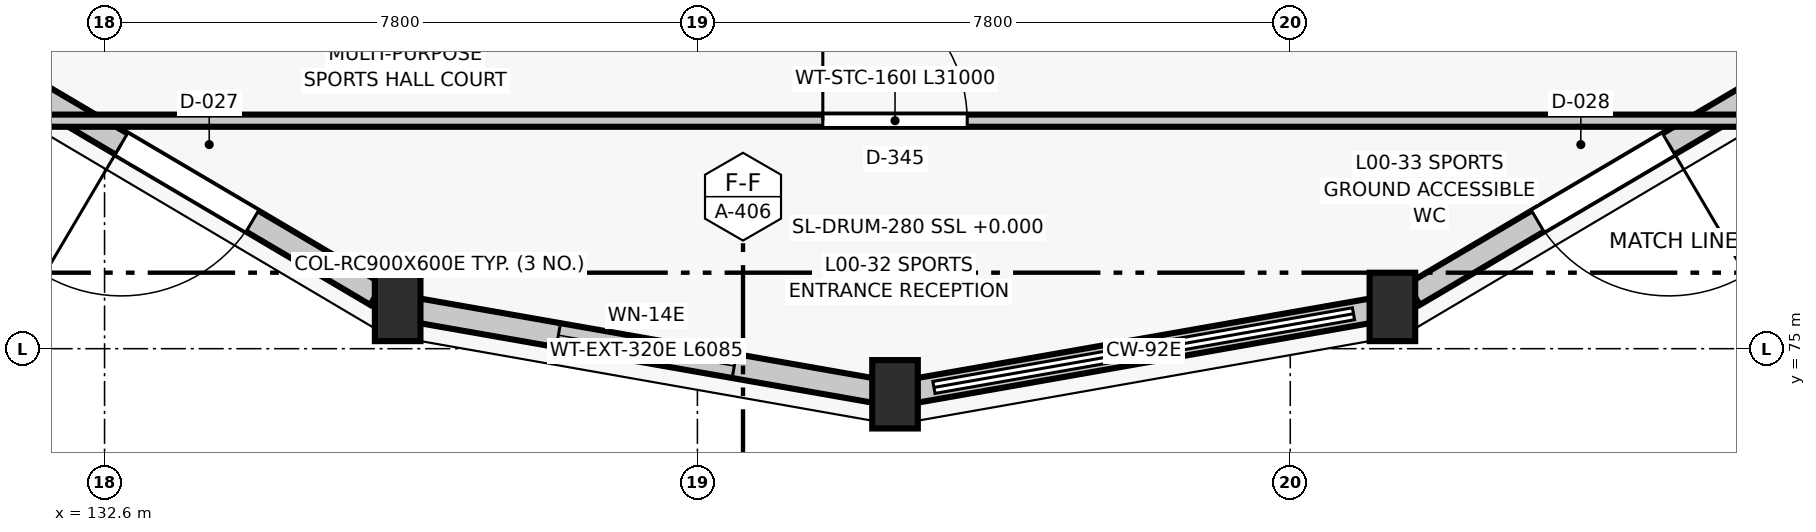
"""IFC4 building model, lengths in metres.
Left out: names, types, materials, properties, quantities, classifications, styles, units other than length and angle.
Written with IfcOpenShell. Run it as: python <this file> out.ifc"""

import sys

from ifc_helpers import new_model, si_unit, direction, frame, frame_2d, origin, origin_2d, place, context, subcontext, project, spatial, rectangle, extrude, element, fill, save


model = new_model("IFC4")
c1 = context("Model", 3, precision=1e-05, world=origin(), true_north=direction((0.0, 1.0)))
c2 = subcontext(c1, "Body", "Model", "MODEL_VIEW")
j1 = project(units=[si_unit("LENGTHUNIT", "METRE"), si_unit("PLANEANGLEUNIT", "RADIAN")], contexts=[c1])
p1 = place(None, origin())
s1 = spatial("IfcSite", under=j1, at=p1, CompositionType="ELEMENT")
p2 = place(p1, origin())
s2 = spatial("IfcBuilding", under=s1, at=p2, CompositionType="ELEMENT")
p3 = place(p2, origin())
s3 = spatial("IfcBuildingStorey", under=s2, at=p3, CompositionType="ELEMENT", Elevation=0.0)
for number, where, z_axis, x_axis in (
    (1, (136.456, 75.549, 0.0), (0.0, 0.0, 1.0), (1.0, 0.0, 0.0)),
    (2, (143.0, 74.4, 0.0), (0.0, 0.0, 1.0), (1.0, 0.0, 0.0)),
    (3, (149.544, 75.549, 0.0), (0.0, 0.0, 1.0), (1.0, 0.0, 0.0)),
):
    element("IfcColumn", number, at=place(p3, frame(where, z_axis=z_axis, x_axis=x_axis)), inside=s3, PredefinedType="COLUMN", context=c2, shape_type="SweptSolid", body=[
        extrude(rectangle(XDim=0.6, YDim=0.9, at=origin_2d()), origin(), (0.0, 0.0, 1.0), 4.5),
    ])
p4 = place(p3, frame((136.177, 75.714, 0.0), z_axis=(0.0, 0.0, 1.0), x_axis=(-0.861235880181, 0.508205429614, 0.0)))
e4 = element("IfcWall", 4, at=p4, inside=s3, PredefinedType="STANDARD", context=c2, shape_type="SweptSolid", body=[
    extrude(rectangle(XDim=5.794, YDim=0.32, at=frame_2d((2.897, 0.0))), origin(), (0.0, 0.0, 1.0), 3.445),
])
p5 = place(p4, frame((1.897, 0.0, 0.0)))
e5 = element("IfcOpeningElement", 5, at=p5, cuts=e4, PredefinedType="OPENING", context=c2, shape_type="SweptSolid", body=[
    extrude(rectangle(XDim=2.0, YDim=2.3, at=frame_2d((1.0, 1.15))), frame((0.0, 0.17, 0.0), z_axis=(0.0, -1.0, 0.0), x_axis=(1.0, 0.0, 0.0)), (0.0, 0.0, 1.0), 0.34),
])
p6 = place(p3, frame((142.725, 74.448, 0.0), z_axis=(0.0, 0.0, 1.0), x_axis=(-0.984927418504, 0.172968148166, 0.0)))
e6 = element("IfcWall", 6, at=p6, inside=s3, PredefinedType="STANDARD", context=c2, shape_type="SweptSolid", body=[
    extrude(rectangle(XDim=6.085, YDim=0.32, at=frame_2d((3.042, 0.0))), origin(), (0.0, 0.0, 1.0), 3.445),
])
p7 = place(p6, frame((1.867, 0.0, 0.9)))
e7 = element("IfcOpeningElement", 7, at=p7, cuts=e6, PredefinedType="OPENING", context=c2, shape_type="SweptSolid", body=[
    extrude(rectangle(XDim=2.35, YDim=1.55, at=frame_2d((1.175, 0.775))), frame((0.0, 0.17, 0.0), z_axis=(0.0, -1.0, 0.0), x_axis=(1.0, 0.0, 0.0)), (0.0, 0.0, 1.0), 0.34),
])
p8 = place(p3, frame((149.269, 75.501, 0.0), z_axis=(0.0, 0.0, 1.0), x_axis=(-0.984927418504, -0.172968148166, 0.0)))
e8 = element("IfcWall", 8, at=p8, inside=s3, PredefinedType="STANDARD", context=c2, shape_type="SweptSolid", body=[
    extrude(rectangle(XDim=6.085, YDim=0.32, at=frame_2d((3.042, 0.0))), origin(), (0.0, 0.0, 1.0), 0.85),
])
p9 = place(p3, frame((154.813, 78.658, 0.0), z_axis=(0.0, 0.0, 1.0), x_axis=(-0.861235880181, -0.508205429614, 0.0)))
e9 = element("IfcWall", 9, at=p9, inside=s3, PredefinedType="STANDARD", context=c2, shape_type="SweptSolid", body=[
    extrude(rectangle(XDim=5.794, YDim=0.32, at=frame_2d((2.897, 0.0))), origin(), (0.0, 0.0, 1.0), 3.445),
])
p10 = place(p9, frame((1.897, 0.0, 0.0)))
e10 = element("IfcOpeningElement", 10, at=p10, cuts=e9, PredefinedType="OPENING", context=c2, shape_type="SweptSolid", body=[
    extrude(rectangle(XDim=2.0, YDim=2.3, at=frame_2d((1.0, 1.15))), frame((0.0, 0.17, 0.0), z_axis=(0.0, -1.0, 0.0), x_axis=(1.0, 0.0, 0.0)), (0.0, 0.0, 1.0), 0.34),
])
p11 = place(p3, frame((127.5, 78.0, 0.0), z_axis=(0.0, 0.0, 1.0), x_axis=(1.0, 0.0, 0.0)))
e11 = element("IfcWall", 11, at=p11, inside=s3, PredefinedType="PARTITIONING", context=c2, shape_type="SweptSolid", body=[
    extrude(rectangle(XDim=31.0, YDim=0.16, at=frame_2d((15.5, 0.0))), origin(), (0.0, 0.0, 1.0), 4.255),
])
p12 = place(p11, frame((14.55, 0.0, 0.0)))
e12 = element("IfcOpeningElement", 12, at=p12, cuts=e11, PredefinedType="OPENING", context=c2, shape_type="SweptSolid", body=[
    extrude(rectangle(XDim=1.9, YDim=2.25, at=frame_2d((0.95, 1.125))), frame((0.0, 0.09, 0.0), z_axis=(0.0, -1.0, 0.0), x_axis=(1.0, 0.0, 0.0)), (0.0, 0.0, 1.0), 0.18),
])
p13 = place(p5, origin())
e13 = element("IfcDoor", 13, at=p13, inside=s3, OperationType="SINGLE_SWING_RIGHT", PredefinedType="DOOR", context=c2, shape_type="SweptSolid", body=[
    extrude(rectangle(XDim=2.0, YDim=2.3, at=frame_2d((1.0, 1.15))), frame((0.0, 0.025, 0.0), z_axis=(0.0, -1.0, 0.0), x_axis=(1.0, 0.0, 0.0)), (0.0, 0.0, 1.0), 0.05),
])
fill(e5, e13)
p14 = place(p7, origin())
e14 = element("IfcWindow", 14, at=p14, inside=s3, PartitioningType="SINGLE_PANEL", PredefinedType="WINDOW", context=c2, shape_type="SweptSolid", body=[
    extrude(rectangle(XDim=2.35, YDim=1.55, at=frame_2d((1.175, 0.775))), frame((0.0, 0.03, 0.0), z_axis=(0.0, -1.0, 0.0), x_axis=(1.0, 0.0, 0.0)), (0.0, 0.0, 1.0), 0.06),
])
fill(e7, e14)
p15 = place(p10, origin())
e15 = element("IfcDoor", 15, at=p15, inside=s3, OperationType="SINGLE_SWING_LEFT", PredefinedType="DOOR", context=c2, shape_type="SweptSolid", body=[
    extrude(rectangle(XDim=2.0, YDim=2.3, at=frame_2d((1.0, 1.15))), frame((0.0, 0.025, 0.0), z_axis=(0.0, -1.0, 0.0), x_axis=(1.0, 0.0, 0.0)), (0.0, 0.0, 1.0), 0.05),
])
fill(e10, e15)
p16 = place(p12, origin())
e16 = element("IfcDoor", 16, at=p16, inside=s3, OperationType="SINGLE_SWING_LEFT", PredefinedType="DOOR", context=c2, shape_type="SweptSolid", body=[
    extrude(rectangle(XDim=1.9, YDim=2.25, at=frame_2d((0.95, 1.125))), frame((0.0, 0.025, 0.0), z_axis=(0.0, -1.0, 0.0), x_axis=(1.0, 0.0, 0.0)), (0.0, 0.0, 1.0), 0.05),
])
fill(e12, e16)
save(model, sys.argv[1])
